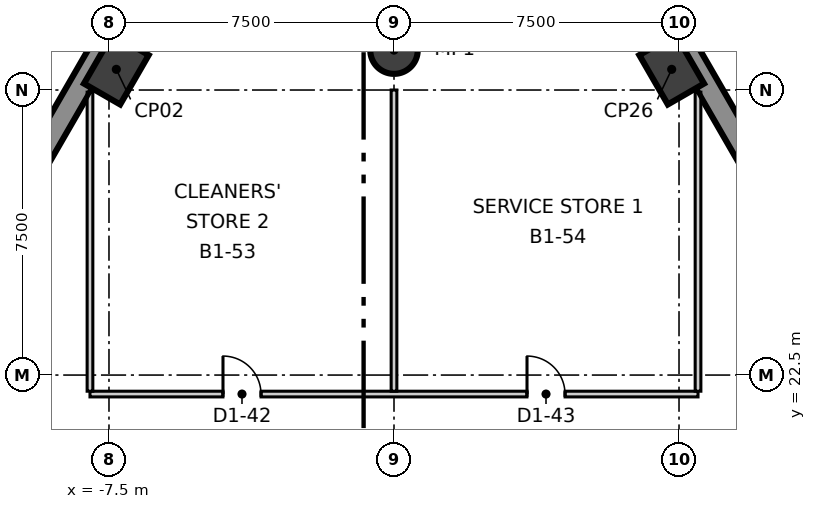
"""IFC4 building model, lengths in metres.
Left out: names, types, materials, properties, quantities, classifications, styles, units other than length and angle.
Written with IfcOpenShell. Run it as: python <this file> out.ifc"""

import sys

from ifc_helpers import new_model, si_unit, direction, frame, frame_2d, origin, origin_2d, place, context, subcontext, project, spatial, rectangle, circle, extrude, element, fill, save


model = new_model("IFC4")
c1 = context("Model", 3, precision=1e-05, world=origin(), true_north=direction((0.0, 1.0)))
c2 = subcontext(c1, "Body", "Model", "MODEL_VIEW")
j1 = project(units=[si_unit("LENGTHUNIT", "METRE"), si_unit("PLANEANGLEUNIT", "RADIAN")], contexts=[c1])
p1 = place(None, origin())
s1 = spatial("IfcSite", under=j1, at=p1, CompositionType="ELEMENT")
p2 = place(p1, origin())
s2 = spatial("IfcBuilding", under=s1, at=p2, CompositionType="ELEMENT")
p3 = place(p2, frame((0.0, 0.0, -5.5)))
s3 = spatial("IfcBuildingStorey", under=s2, at=p3, CompositionType="ELEMENT", Elevation=-5.5)
for number, where, z_axis, x_axis in (
    (1, (34.944, -16.125, -0.4), (0.0, 0.0, 1.0), (-0.5, 0.866, 0.0)),
    (2, (-3.507, 38.325, -0.4), (0.0, 0.0, 1.0), (-0.5, -0.866, 0.0)),
):
    element("IfcWall", number, at=place(p3, frame(where, z_axis=z_axis, x_axis=x_axis)), inside=s3, PredefinedType="SOLIDWALL", context=c2, shape_type="SweptSolid", body=[
        extrude(rectangle(XDim=62.874, YDim=0.6, at=frame_2d((31.437, 0.0))), origin(), (0.0, 0.0, 1.0), 5.5),
    ])
for number, where, z_axis, x_axis in (
    (3, (-7.307, 30.544, -0.4), (0.0, 0.0, 1.0), (0.5, 0.866, 0.0)),
    (4, (7.307, 30.544, -0.4), (0.0, 0.0, 1.0), (-0.5, 0.866, 0.0)),
):
    element("IfcColumn", number, at=place(p3, frame(where, z_axis=z_axis, x_axis=x_axis)), inside=s3, PredefinedType="COLUMN", context=c2, shape_type="SweptSolid", body=[
        extrude(rectangle(XDim=1.5, YDim=1.1, at=origin_2d()), origin(), (0.0, 0.0, 1.0), 5.5),
    ])
p4 = place(p3, frame((0.0, 31.05, -0.4), z_axis=(0.0, 0.0, 1.0), x_axis=(1.0, 0.0, 0.0)))
e5 = element("IfcColumn", 5, at=p4, inside=s3, PredefinedType="COLUMN", context=c2, shape_type="SweptSolid", body=[
    extrude(circle(Radius=0.625, at=origin_2d()), origin(), (0.0, 0.0, 1.0), 5.5),
])
p5 = place(p3, frame((-8.0, 22.0, 0.0), z_axis=(0.0, 0.0, 1.0), x_axis=(1.0, 0.0, 0.0)))
e6 = element("IfcWall", 6, at=p5, inside=s3, PredefinedType="PARTITIONING", context=c2, shape_type="SweptSolid", body=[
    extrude(rectangle(XDim=16.0, YDim=0.15, at=frame_2d((8.0, 0.0))), origin(), (0.0, 0.0, 1.0), 5.1),
])
p6 = place(p5, frame((3.5, 0.0, 0.0)))
e7 = element("IfcOpeningElement", 7, at=p6, cuts=e6, PredefinedType="OPENING", context=c2, shape_type="SweptSolid", body=[
    extrude(rectangle(XDim=1.0, YDim=2.1, at=frame_2d((0.5, 1.05))), frame((0.0, 0.085, 0.0), z_axis=(0.0, -1.0, 0.0), x_axis=(1.0, 0.0, 0.0)), (0.0, 0.0, 1.0), 0.17),
])
p7 = place(p5, frame((11.5, 0.0, 0.0)))
e8 = element("IfcOpeningElement", 8, at=p7, cuts=e6, PredefinedType="OPENING", context=c2, shape_type="SweptSolid", body=[
    extrude(rectangle(XDim=1.0, YDim=2.1, at=frame_2d((0.5, 1.05))), frame((0.0, 0.085, 0.0), z_axis=(0.0, -1.0, 0.0), x_axis=(1.0, 0.0, 0.0)), (0.0, 0.0, 1.0), 0.17),
])
p8 = place(p3, frame((-8.0, 22.075, 0.0), z_axis=(0.0, 0.0, 1.0), x_axis=(0.0, 1.0, 0.0)))
e9 = element("IfcWall", 9, at=p8, inside=s3, PredefinedType="PARTITIONING", context=c2, shape_type="SweptSolid", body=[
    extrude(rectangle(XDim=7.868, YDim=0.15, at=frame_2d((3.934, 0.0))), origin(), (0.0, 0.0, 1.0), 5.1),
])
p9 = place(p3, frame((0.0, 22.075, 0.0), z_axis=(0.0, 0.0, 1.0), x_axis=(0.0, 1.0, 0.0)))
e10 = element("IfcWall", 10, at=p9, inside=s3, PredefinedType="PARTITIONING", context=c2, shape_type="SweptSolid", body=[
    extrude(rectangle(XDim=7.925, YDim=0.15, at=frame_2d((3.962, 0.0))), origin(), (0.0, 0.0, 1.0), 4.45),
])
p10 = place(p3, frame((8.0, 22.075, 0.0), z_axis=(0.0, 0.0, 1.0), x_axis=(0.0, 1.0, 0.0)))
e11 = element("IfcWall", 11, at=p10, inside=s3, PredefinedType="PARTITIONING", context=c2, shape_type="SweptSolid", body=[
    extrude(rectangle(XDim=7.868, YDim=0.15, at=frame_2d((3.934, 0.0))), origin(), (0.0, 0.0, 1.0), 5.1),
])
p11 = place(p6, origin())
e12 = element("IfcDoor", 12, at=p11, inside=s3, OperationType="SINGLE_SWING_RIGHT", PredefinedType="DOOR", context=c2, shape_type="SweptSolid", body=[
    extrude(rectangle(XDim=1.0, YDim=2.1, at=frame_2d((0.5, 1.05))), frame((0.0, 0.025, 0.0), z_axis=(0.0, -1.0, 0.0), x_axis=(1.0, 0.0, 0.0)), (0.0, 0.0, 1.0), 0.05),
])
fill(e7, e12)
p12 = place(p7, origin())
e13 = element("IfcDoor", 13, at=p12, inside=s3, OperationType="SINGLE_SWING_RIGHT", PredefinedType="DOOR", context=c2, shape_type="SweptSolid", body=[
    extrude(rectangle(XDim=1.0, YDim=2.1, at=frame_2d((0.5, 1.05))), frame((0.0, 0.025, 0.0), z_axis=(0.0, -1.0, 0.0), x_axis=(1.0, 0.0, 0.0)), (0.0, 0.0, 1.0), 0.05),
])
fill(e8, e13)
save(model, sys.argv[1])
